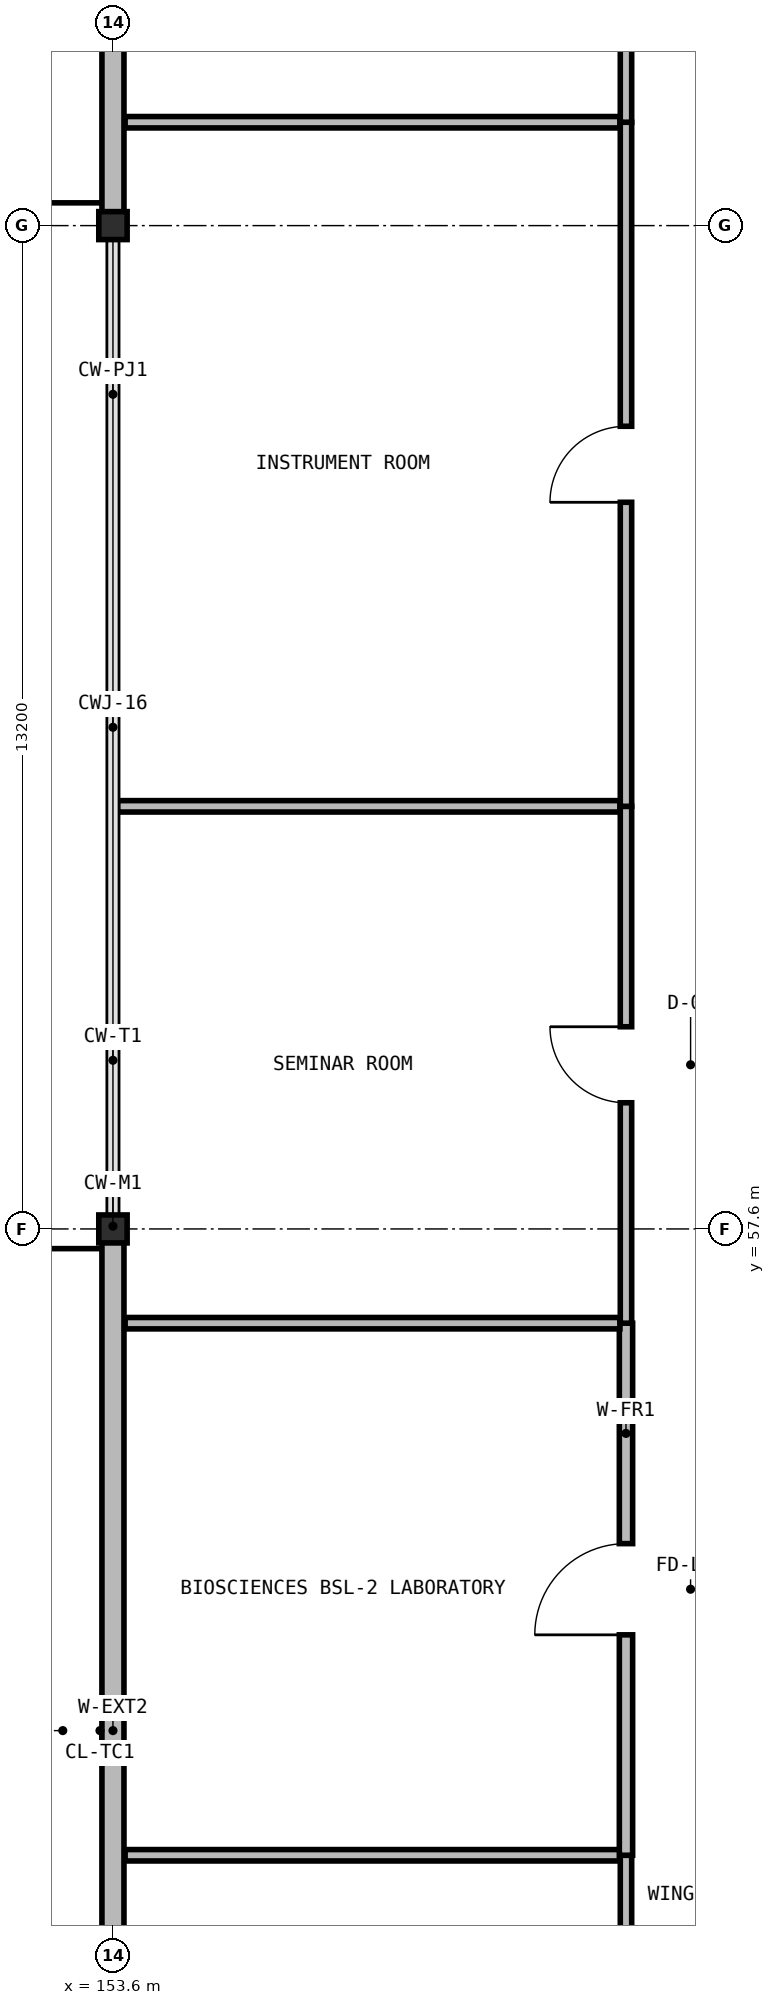
"""IFC4 building model, lengths in metres.
Left out: names, types, materials, properties, quantities, classifications, styles, units other than length and angle.
Written with IfcOpenShell. Run it as: python <this file> out.ifc"""

import sys

from ifc_helpers import new_model, si_unit, direction, frame, frame_2d, origin, origin_2d, place, context, subcontext, project, spatial, rectangle, i_section, extrude, element, fill, save


model = new_model("IFC4")
c1 = context("Model", 3, precision=1e-05, world=origin(), true_north=direction((0.0, 1.0)))
c2 = subcontext(c1, "Body", "Model", "MODEL_VIEW")
j1 = project(units=[si_unit("LENGTHUNIT", "METRE"), si_unit("PLANEANGLEUNIT", "RADIAN")], contexts=[c1])
p1 = place(None, origin())
s1 = spatial("IfcSite", under=j1, at=p1, CompositionType="ELEMENT")
p2 = place(p1, origin())
s2 = spatial("IfcBuilding", under=s1, at=p2, CompositionType="ELEMENT")
p3 = place(p2, frame((0.0, 0.0, 18.9)))
s3 = spatial("IfcBuildingStorey", under=s2, at=p3, CompositionType="ELEMENT", Elevation=18.9)
for number, where, z_axis, x_axis in (
    (1, (153.6, 57.6, 0.0), (0.0, 0.0, 1.0), (1.0, 0.0, 0.0)),
    (2, (153.6, 70.8, 0.0), (0.0, 0.0, 1.0), (1.0, 0.0, 0.0)),
):
    element("IfcColumn", number, at=place(p3, frame(where, z_axis=z_axis, x_axis=x_axis)), inside=s3, PredefinedType="COLUMN", context=c2, shape_type="SweptSolid", body=[
        extrude(i_section(OverallWidth=0.373, OverallDepth=0.368, WebThickness=0.017, FlangeThickness=0.027, at=origin_2d()), origin(), (0.0, 0.0, 1.0), 4.55),
    ])
p4 = place(p3, frame((153.6, 44.404, 0.0), z_axis=(0.0, 0.0, 1.0), x_axis=(0.0, 1.0, 0.0)))
e3 = element("IfcWall", 3, at=p4, inside=s3, PredefinedType="SOLIDWALL", context=c2, shape_type="SweptSolid", body=[
    extrude(rectangle(XDim=13.192, YDim=0.29, at=frame_2d((6.596, 0.0))), origin(), (0.0, 0.0, 1.0), 3.742),
])
p5 = place(p3, frame((153.6, 70.804, 0.0), z_axis=(0.0, 0.0, 1.0), x_axis=(0.0, 1.0, 0.0)))
e4 = element("IfcWall", 4, at=p5, inside=s3, PredefinedType="SOLIDWALL", context=c2, shape_type="SweptSolid", body=[
    extrude(rectangle(XDim=13.047, YDim=0.29, at=frame_2d((6.523, 0.0))), origin(), (0.0, 0.0, 1.0), 3.742),
])
p6 = place(p5, frame((5.723, 0.0, 0.95)))
e5 = element("IfcOpeningElement", 5, at=p6, cuts=e4, PredefinedType="OPENING", context=c2, shape_type="SweptSolid", body=[
    extrude(rectangle(XDim=1.6, YDim=1.4, at=frame_2d((0.8, 0.7))), frame((0.0, 0.155, 0.0), z_axis=(0.0, -1.0, 0.0), x_axis=(1.0, 0.0, 0.0)), (0.0, 0.0, 1.0), 0.31),
])
p7 = place(p3, frame((160.35, 39.16, 0.0), z_axis=(0.0, 0.0, 1.0), x_axis=(0.0, 1.0, 0.0)))
e6 = element("IfcWall", 6, at=p7, inside=s3, PredefinedType="PARTITIONING", context=c2, shape_type="SweptSolid", body=[
    extrude(rectangle(XDim=10.2, YDim=0.15, at=frame_2d((5.1, 0.0))), origin(), (0.0, 0.0, 1.0), 4.3),
])
p8 = place(p7, frame((6.39, 0.0, 0.0)))
e7 = element("IfcOpeningElement", 7, at=p8, cuts=e6, PredefinedType="OPENING", context=c2, shape_type="SweptSolid", body=[
    extrude(rectangle(XDim=1.0, YDim=2.2, at=frame_2d((0.5, 1.1))), frame((0.0, 0.085, 0.0), z_axis=(0.0, -1.0, 0.0), x_axis=(1.0, 0.0, 0.0)), (0.0, 0.0, 1.0), 0.17),
])
p9 = place(p3, frame((153.76, 49.36, 0.0), z_axis=(0.0, 0.0, 1.0), x_axis=(1.0, 0.0, 0.0)))
e8 = element("IfcWall", 8, at=p9, inside=s3, PredefinedType="PARTITIONING", context=c2, shape_type="SweptSolid", body=[
    extrude(rectangle(XDim=6.51, YDim=0.15, at=frame_2d((3.255, 0.0))), origin(), (0.0, 0.0, 1.0), 4.3),
])
p10 = place(p3, frame((160.35, 49.36, 0.0), z_axis=(0.0, 0.0, 1.0), x_axis=(0.0, 1.0, 0.0)))
e9 = element("IfcWall", 9, at=p10, inside=s3, PredefinedType="PARTITIONING", context=c2, shape_type="SweptSolid", body=[
    extrude(rectangle(XDim=7.0, YDim=0.175, at=frame_2d((3.5, 0.0))), origin(), (0.0, 0.0, 1.0), 4.3),
])
p11 = place(p10, frame((2.9, 0.0, 0.0)))
e10 = element("IfcOpeningElement", 10, at=p11, cuts=e9, PredefinedType="OPENING", context=c2, shape_type="SweptSolid", body=[
    extrude(rectangle(XDim=1.2, YDim=2.2, at=frame_2d((0.6, 1.1))), frame((0.0, 0.097, 0.0), z_axis=(0.0, -1.0, 0.0), x_axis=(1.0, 0.0, 0.0)), (0.0, 0.0, 1.0), 0.195),
])
p12 = place(p3, frame((153.76, 56.36, 0.0), z_axis=(0.0, 0.0, 1.0), x_axis=(1.0, 0.0, 0.0)))
e11 = element("IfcWall", 11, at=p12, inside=s3, PredefinedType="PARTITIONING", context=c2, shape_type="SweptSolid", body=[
    extrude(rectangle(XDim=6.51, YDim=0.15, at=frame_2d((3.255, 0.0))), origin(), (0.0, 0.0, 1.0), 4.3),
])
p13 = place(p3, frame((160.35, 56.36, 0.0), z_axis=(0.0, 0.0, 1.0), x_axis=(0.0, 1.0, 0.0)))
e12 = element("IfcWall", 12, at=p13, inside=s3, PredefinedType="PARTITIONING", context=c2, shape_type="SweptSolid", body=[
    extrude(rectangle(XDim=6.8, YDim=0.15, at=frame_2d((3.4, 0.0))), origin(), (0.0, 0.0, 1.0), 4.3),
])
p14 = place(p13, frame((2.9, 0.0, 0.0)))
e13 = element("IfcOpeningElement", 13, at=p14, cuts=e12, PredefinedType="OPENING", context=c2, shape_type="SweptSolid", body=[
    extrude(rectangle(XDim=1.0, YDim=2.2, at=frame_2d((0.5, 1.1))), frame((0.0, 0.085, 0.0), z_axis=(0.0, -1.0, 0.0), x_axis=(1.0, 0.0, 0.0)), (0.0, 0.0, 1.0), 0.17),
])
p15 = place(p3, frame((153.66, 63.16, 0.0), z_axis=(0.0, 0.0, 1.0), x_axis=(1.0, 0.0, 0.0)))
e14 = element("IfcWall", 14, at=p15, inside=s3, PredefinedType="PARTITIONING", context=c2, shape_type="SweptSolid", body=[
    extrude(rectangle(XDim=6.61, YDim=0.15, at=frame_2d((3.305, 0.0))), origin(), (0.0, 0.0, 1.0), 4.3),
])
p16 = place(p3, frame((160.35, 63.16, 0.0), z_axis=(0.0, 0.0, 1.0), x_axis=(0.0, 1.0, 0.0)))
e15 = element("IfcWall", 15, at=p16, inside=s3, PredefinedType="PARTITIONING", context=c2, shape_type="SweptSolid", body=[
    extrude(rectangle(XDim=9.0, YDim=0.15, at=frame_2d((4.5, 0.0))), origin(), (0.0, 0.0, 1.0), 4.3),
])
p17 = place(p16, frame((4.0, 0.0, 0.0)))
e16 = element("IfcOpeningElement", 16, at=p17, cuts=e15, PredefinedType="OPENING", context=c2, shape_type="SweptSolid", body=[
    extrude(rectangle(XDim=1.0, YDim=2.2, at=frame_2d((0.5, 1.1))), frame((0.0, 0.085, 0.0), z_axis=(0.0, -1.0, 0.0), x_axis=(1.0, 0.0, 0.0)), (0.0, 0.0, 1.0), 0.17),
])
p18 = place(p3, frame((153.76, 72.16, 0.0), z_axis=(0.0, 0.0, 1.0), x_axis=(1.0, 0.0, 0.0)))
e17 = element("IfcWall", 17, at=p18, inside=s3, PredefinedType="PARTITIONING", context=c2, shape_type="SweptSolid", body=[
    extrude(rectangle(XDim=6.51, YDim=0.15, at=frame_2d((3.255, 0.0))), origin(), (0.0, 0.0, 1.0), 4.3),
])
p19 = place(p3, frame((160.35, 72.16, 0.0), z_axis=(0.0, 0.0, 1.0), x_axis=(0.0, 1.0, 0.0)))
e18 = element("IfcWall", 18, at=p19, inside=s3, PredefinedType="PARTITIONING", context=c2, shape_type="SweptSolid", body=[
    extrude(rectangle(XDim=11.68, YDim=0.15, at=frame_2d((5.84, 0.0))), origin(), (0.0, 0.0, 1.0), 4.3),
])
p20 = place(p19, frame((5.34, 0.0, 0.0)))
e19 = element("IfcOpeningElement", 19, at=p20, cuts=e18, PredefinedType="OPENING", context=c2, shape_type="SweptSolid", body=[
    extrude(rectangle(XDim=1.0, YDim=2.2, at=frame_2d((0.5, 1.1))), frame((0.0, 0.085, 0.0), z_axis=(0.0, -1.0, 0.0), x_axis=(1.0, 0.0, 0.0)), (0.0, 0.0, 1.0), 0.17),
])
p21 = place(p11, origin())
e20 = element("IfcDoor", 20, at=p21, inside=s3, OperationType="SINGLE_SWING_LEFT", PredefinedType="DOOR", context=c2, shape_type="SweptSolid", body=[
    extrude(rectangle(XDim=1.2, YDim=2.2, at=frame_2d((0.6, 1.1))), frame((0.0, 0.025, 0.0), z_axis=(0.0, -1.0, 0.0), x_axis=(1.0, 0.0, 0.0)), (0.0, 0.0, 1.0), 0.05),
])
fill(e10, e20)
p22 = place(p14, origin())
e21 = element("IfcDoor", 21, at=p22, inside=s3, OperationType="SINGLE_SWING_RIGHT", PredefinedType="DOOR", context=c2, shape_type="SweptSolid", body=[
    extrude(rectangle(XDim=1.0, YDim=2.2, at=frame_2d((0.5, 1.1))), frame((0.0, 0.025, 0.0), z_axis=(0.0, -1.0, 0.0), x_axis=(1.0, 0.0, 0.0)), (0.0, 0.0, 1.0), 0.05),
])
fill(e13, e21)
p23 = place(p17, origin())
e22 = element("IfcDoor", 22, at=p23, inside=s3, OperationType="SINGLE_SWING_LEFT", PredefinedType="DOOR", context=c2, shape_type="SweptSolid", body=[
    extrude(rectangle(XDim=1.0, YDim=2.2, at=frame_2d((0.5, 1.1))), frame((0.0, 0.025, 0.0), z_axis=(0.0, -1.0, 0.0), x_axis=(1.0, 0.0, 0.0)), (0.0, 0.0, 1.0), 0.05),
])
fill(e16, e22)
save(model, sys.argv[1])
